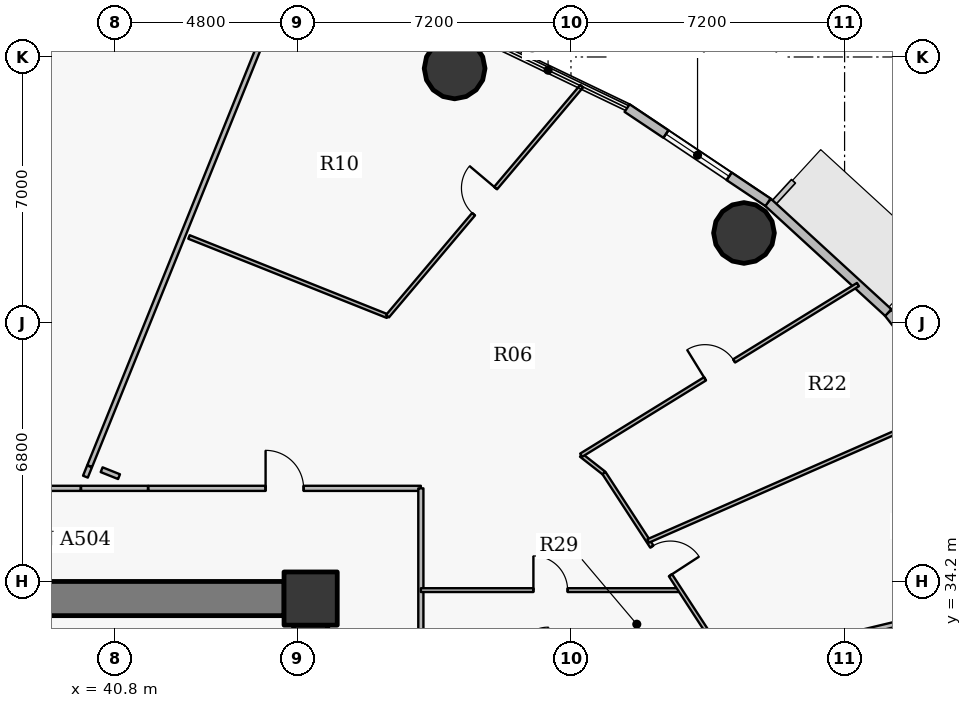
"""IFC4 building model, lengths in metres.
Left out: names, types, materials, properties, quantities, classifications, styles, units other than length and angle.
Written with IfcOpenShell. Run it as: python <this file> out.ifc"""

import sys

from ifc_helpers import new_model, si_unit, direction, frame, frame_2d, origin, origin_2d, place, context, subcontext, project, spatial, rectangle, hollow_circle, extrude, source, transform, mapped, element, fill, save


model = new_model("IFC4")
c1 = context("Model", 3, precision=1e-05, world=origin(), true_north=direction((0.0, 1.0)))
c2 = subcontext(c1, "Body", "Model", "MODEL_VIEW")
j1 = project(units=[si_unit("LENGTHUNIT", "METRE"), si_unit("PLANEANGLEUNIT", "RADIAN")], contexts=[c1])
p1 = place(None, origin())
s1 = spatial("IfcSite", under=j1, at=p1, CompositionType="ELEMENT")
p2 = place(p1, origin())
s2 = spatial("IfcBuilding", under=s1, at=p2, CompositionType="ELEMENT")
p3 = place(p2, frame((0.0, 0.0, 82.8)))
s3 = spatial("IfcBuildingStorey", under=s2, at=p3, CompositionType="ELEMENT", Elevation=82.8)
p4 = place(p3, frame((45.95, 33.75, 0.0), z_axis=(0.0, 0.0, 1.0), x_axis=(1.0, 0.0, 0.0)))
e1 = element("IfcColumn", 1, at=p4, inside=s3, PredefinedType="COLUMN", context=c2, shape_type="SweptSolid", body=[
    extrude(rectangle(XDim=1.4, YDim=1.4, at=origin_2d()), origin(), (0.0, 0.0, 1.0), 4.2),
])
p5 = place(p3, frame((26.75, 33.75, 0.0), z_axis=(0.0, 0.0, 1.0), x_axis=(1.0, 0.0, 0.0)))
e2 = element("IfcWall", 2, at=p5, inside=s3, PredefinedType="SHEAR", context=c2, shape_type="SweptSolid", body=[
    extrude(rectangle(XDim=18.5, YDim=0.9, at=frame_2d((9.25, 0.0))), origin(), (0.0, 0.0, 1.0), 3.35),
])
p6 = place(p3, frame((45.95, 33.05, 0.0), z_axis=(0.0, 0.0, 1.0), x_axis=(0.0, -1.0, 0.0)))
e3 = element("IfcWall", 3, at=p6, inside=s3, PredefinedType="SHEAR", context=c2, shape_type="SweptSolid", body=[
    extrude(rectangle(XDim=12.1, YDim=0.9, at=frame_2d((6.05, 0.0))), origin(), (0.0, 0.0, 1.0), 3.35),
])
p7 = place(p6, frame((5.64, 0.0, 0.0)))
e4 = element("IfcOpeningElement", 4, at=p7, cuts=e3, PredefinedType="OPENING", context=c2, shape_type="SweptSolid", body=[
    extrude(rectangle(XDim=0.82, YDim=2.1, at=origin_2d()), frame((0.41, 0.46, 1.05), z_axis=(0.0, -1.0, 0.0), x_axis=(1.0, 0.0, 0.0)), (0.0, 0.0, 1.0), 0.92),
])
for number, where, z_axis, x_axis in (
    (5, (57.353, 43.369, 0.0), (0.0, 0.0, 1.0), (1.0, 0.0, 0.0)),
    (6, (49.738, 47.699, 0.0), (0.0, 0.0, 1.0), (1.0, 0.0, 0.0)),
):
    element("IfcColumn", number, at=place(p3, frame(where, z_axis=z_axis, x_axis=x_axis)), inside=s3, PredefinedType="COLUMN", context=c2, shape_type="SweptSolid", body=[
        extrude(hollow_circle(Radius=0.8, WallThickness=0.045, at=origin_2d()), origin(), (0.0, 0.0, 1.0), 4.2),
    ])
p8 = place(p3, frame((61.15, 41.275, 0.0), z_axis=(0.0, 0.0, 1.0), x_axis=(0.616295508253, -0.787514981767, 0.0)))
e7 = element("IfcWall", 7, at=p8, inside=s3, PredefinedType="SOLIDWALL", context=c2, shape_type="SweptSolid", body=[
    extrude(rectangle(XDim=4.129, YDim=0.24, at=frame_2d((2.065, 0.0))), origin(), (0.0, 0.0, 1.0), 3.9),
])
p9 = place(p8, frame((0.908, 0.0, 0.9)))
e8 = element("IfcOpeningElement", 8, at=p9, cuts=e7, PredefinedType="OPENING", context=c2, shape_type="SweptSolid", body=[
    extrude(rectangle(XDim=1.6, YDim=1.75, at=origin_2d()), frame((0.8, 0.13, 0.875), z_axis=(0.0, -1.0, 0.0), x_axis=(1.0, 0.0, 0.0)), (0.0, 0.0, 1.0), 0.26),
])
p10 = place(p3, frame((57.985, 44.176, 0.0), z_axis=(0.0, 0.0, 1.0), x_axis=(0.737116376281, -0.67576582321, 0.0)))
e9 = element("IfcWall", 9, at=p10, inside=s3, PredefinedType="SOLIDWALL", context=c2, shape_type="SweptSolid", body=[
    extrude(rectangle(XDim=4.294, YDim=0.24, at=frame_2d((2.147, 0.0))), origin(), (0.0, 0.0, 1.0), 3.9),
])
p11 = place(p3, frame((54.277, 46.656, 0.0), z_axis=(0.0, 0.0, 1.0), x_axis=(0.831240982525, -0.555912249343, 0.0)))
e10 = element("IfcWall", 10, at=p11, inside=s3, PredefinedType="SOLIDWALL", context=c2, shape_type="SweptSolid", body=[
    extrude(rectangle(XDim=4.46, YDim=0.24, at=frame_2d((2.23, 0.0))), origin(), (0.0, 0.0, 1.0), 3.9),
])
p12 = place(p11, frame((1.23, 0.0, 0.9)))
e11 = element("IfcOpeningElement", 11, at=p12, cuts=e10, PredefinedType="OPENING", context=c2, shape_type="SweptSolid", body=[
    extrude(rectangle(XDim=2.0, YDim=1.75, at=origin_2d()), frame((1.0, 0.13, 0.875), z_axis=(0.0, -1.0, 0.0), x_axis=(1.0, 0.0, 0.0)), (0.0, 0.0, 1.0), 0.26),
])
p13 = place(p3, frame((32.101, 36.65, 0.0), z_axis=(0.0, 0.0, 1.0), x_axis=(1.0, 0.0, 0.0)))
e12 = element("IfcWall", 12, at=p13, inside=s3, PredefinedType="PARTITIONING", context=c2, shape_type="SweptSolid", body=[
    extrude(rectangle(XDim=7.798, YDim=0.135, at=frame_2d((3.899, 0.0))), origin(), (0.0, 0.0, 1.0), 3.235),
])
p14 = place(p13, frame((4.25, 0.0, 0.0)))
e13 = element("IfcOpeningElement", 13, at=p14, cuts=e12, PredefinedType="OPENING", context=c2, shape_type="SweptSolid", body=[
    extrude(rectangle(XDim=1.05, YDim=2.15, at=origin_2d()), frame((0.525, 0.078, 1.075), z_axis=(0.0, -1.0, 0.0), x_axis=(1.0, 0.0, 0.0)), (0.0, 0.0, 1.0), 0.155),
])
p15 = place(p13, frame((0.506, 0.0, 0.0)))
e14 = element("IfcOpeningElement", 14, at=p15, cuts=e12, PredefinedType="OPENING", context=c2, shape_type="SweptSolid", body=[
    extrude(rectangle(XDim=0.82, YDim=2.1, at=origin_2d()), frame((0.41, 0.078, 1.05), z_axis=(0.0, -1.0, 0.0), x_axis=(1.0, 0.0, 0.0)), (0.0, 0.0, 1.0), 0.155),
])
p16 = place(p3, frame((40.136, 37.236, 0.0), z_axis=(0.0, 0.0, 1.0), x_axis=(0.374600258899, 0.927186413852, 0.0)))
e15 = element("IfcWall", 15, at=p16, inside=s3, PredefinedType="PARTITIONING", context=c2, shape_type="SweptSolid", body=[
    extrude(rectangle(XDim=13.945, YDim=0.135, at=frame_2d((6.972, 0.0))), origin(), (0.0, 0.0, 1.0), 3.285),
])
p17 = place(p3, frame((41.679, 36.65, 0.0), z_axis=(0.0, 0.0, 1.0), x_axis=(1.0, 0.0, 0.0)))
e16 = element("IfcWall", 16, at=p17, inside=s3, PredefinedType="PARTITIONING", context=c2, shape_type="SweptSolid", body=[
    extrude(rectangle(XDim=7.171, YDim=0.135, at=frame_2d((3.586, 0.0))), origin(), (0.0, 0.0, 1.0), 3.235),
])
p18 = place(p17, frame((3.086, 0.0, 0.0)))
e17 = element("IfcOpeningElement", 17, at=p18, cuts=e16, PredefinedType="OPENING", context=c2, shape_type="SweptSolid", body=[
    extrude(rectangle(XDim=1.0, YDim=2.15, at=origin_2d()), frame((0.5, 0.078, 1.075), z_axis=(0.0, -1.0, 0.0), x_axis=(1.0, 0.0, 0.0)), (0.0, 0.0, 1.0), 0.155),
])
p19 = place(p3, frame((42.749, 43.264, 0.0), z_axis=(0.0, 0.0, 1.0), x_axis=(0.928808679707, -0.370559626107, 0.0)))
e18 = element("IfcWall", 18, at=p19, inside=s3, PredefinedType="PARTITIONING", context=c2, shape_type="SweptSolid", body=[
    extrude(rectangle(XDim=5.623, YDim=0.1, at=frame_2d((2.812, 0.0))), origin(), (0.0, 0.0, 1.0), 3.235),
])
p20 = place(p3, frame((47.972, 41.18, 0.0), z_axis=(0.0, 0.0, 1.0), x_axis=(0.645114462575, 0.764085944234, 0.0)))
e19 = element("IfcWall", 19, at=p20, inside=s3, PredefinedType="PARTITIONING", context=c2, shape_type="SweptSolid", body=[
    extrude(rectangle(XDim=7.923, YDim=0.1, at=frame_2d((3.961, 0.0))), origin(), (0.0, 0.0, 1.0), 3.285),
])
p21 = place(p20, frame((3.511, 0.0, 0.0)))
e20 = element("IfcOpeningElement", 20, at=p21, cuts=e19, PredefinedType="OPENING", context=c2, shape_type="SweptSolid", body=[
    extrude(rectangle(XDim=0.9, YDim=2.1, at=origin_2d()), frame((0.45, 0.06, 1.05), z_axis=(0.0, -1.0, 0.0), x_axis=(1.0, 0.0, 0.0)), (0.0, 0.0, 1.0), 0.12),
])
p22 = place(p3, frame((48.85, 30.638, 0.0), z_axis=(0.0, 0.0, 1.0), x_axis=(0.0, 1.0, 0.0)))
e21 = element("IfcWall", 21, at=p22, inside=s3, PredefinedType="PARTITIONING", context=c2, shape_type="SweptSolid", body=[
    extrude(rectangle(XDim=6.011, YDim=0.135, at=frame_2d((3.006, 0.0))), origin(), (0.0, 0.0, 1.0), 3.235),
])
p23 = place(p3, frame((48.85, 33.972, 0.0), z_axis=(0.0, 0.0, 1.0), x_axis=(1.0, 0.0, 0.0)))
e22 = element("IfcWall", 22, at=p23, inside=s3, PredefinedType="PARTITIONING", context=c2, shape_type="SweptSolid", body=[
    extrude(rectangle(XDim=6.823, YDim=0.1, at=frame_2d((3.412, 0.0))), origin(), (0.0, 0.0, 1.0), 3.9),
])
p24 = place(p23, frame((2.961, 0.0, 0.0)))
e23 = element("IfcOpeningElement", 23, at=p24, cuts=e22, PredefinedType="OPENING", context=c2, shape_type="SweptSolid", body=[
    extrude(rectangle(XDim=0.9, YDim=2.1, at=origin_2d()), frame((0.45, 0.06, 1.05), z_axis=(0.0, -1.0, 0.0), x_axis=(1.0, 0.0, 0.0)), (0.0, 0.0, 1.0), 0.12),
])
p25 = place(p3, frame((49.093, 30.138, 0.0), z_axis=(0.0, 0.0, 1.0), x_axis=(0.972454817416, 0.233091458627, 0.0)))
e24 = element("IfcWall", 24, at=p25, inside=s3, PredefinedType="PARTITIONING", context=c2, shape_type="SweptSolid", body=[
    extrude(rectangle(XDim=17.058, YDim=0.135, at=frame_2d((8.529, 0.0))), origin(), (0.0, 0.0, 1.0), 3.235),
])
p26 = place(p3, frame((53.068, 37.522, 0.0), z_axis=(0.0, 0.0, 1.0), x_axis=(0.787383409887, -0.616463596521, 0.0)))
e25 = element("IfcWall", 25, at=p26, inside=s3, PredefinedType="PARTITIONING", context=c2, shape_type="SweptSolid", body=[
    extrude(rectangle(XDim=0.763, YDim=0.1, at=frame_2d((0.381, 0.0))), origin(), (0.0, 0.0, 1.0), 3.9),
])
p27 = place(p3, frame((53.068, 37.522, 0.0), z_axis=(0.0, 0.0, 1.0), x_axis=(0.851237784686, 0.524780176763, 0.0)))
e26 = element("IfcWall", 26, at=p27, inside=s3, PredefinedType="PARTITIONING", context=c2, shape_type="SweptSolid", body=[
    extrude(rectangle(XDim=8.557, YDim=0.1, at=frame_2d((4.278, 0.0))), origin(), (0.0, 0.0, 1.0), 3.285),
])
p28 = place(p27, frame((3.828, 0.0, 0.0)))
e27 = element("IfcOpeningElement", 27, at=p28, cuts=e26, PredefinedType="OPENING", context=c2, shape_type="SweptSolid", body=[
    extrude(rectangle(XDim=0.9, YDim=2.1, at=origin_2d()), frame((0.45, 0.06, 1.05), z_axis=(0.0, -1.0, 0.0), x_axis=(1.0, 0.0, 0.0)), (0.0, 0.0, 1.0), 0.12),
])
p29 = place(p3, frame((53.669, 37.052, 0.0), z_axis=(0.0, 0.0, 1.0), x_axis=(0.545413765252, -0.8381669432, 0.0)))
e28 = element("IfcWall", 28, at=p29, inside=s3, PredefinedType="PARTITIONING", context=c2, shape_type="SweptSolid", body=[
    extrude(rectangle(XDim=5.688, YDim=0.1, at=frame_2d((2.844, 0.0))), origin(), (0.0, 0.0, 1.0), 3.235),
])
p30 = place(p29, frame((2.308, 0.0, 0.0)))
e29 = element("IfcOpeningElement", 29, at=p30, cuts=e28, PredefinedType="OPENING", context=c2, shape_type="SweptSolid", body=[
    extrude(rectangle(XDim=0.9, YDim=2.1, at=origin_2d()), frame((0.45, 0.06, 1.05), z_axis=(0.0, -1.0, 0.0), x_axis=(1.0, 0.0, 0.0)), (0.0, 0.0, 1.0), 0.12),
])
p31 = place(p3, frame((54.831, 35.266, 0.0), z_axis=(0.0, 0.0, 1.0), x_axis=(0.915674102686, 0.401921556613, 0.0)))
e30 = element("IfcWall", 30, at=p31, inside=s3, PredefinedType="PARTITIONING", context=c2, shape_type="SweptSolid", body=[
    extrude(rectangle(XDim=8.964, YDim=0.1, at=frame_2d((4.482, 0.0))), origin(), (0.0, 0.0, 1.0), 3.285),
])
p32 = place(p3, frame((39.909, 36.65, 0.0), z_axis=(0.0, 0.0, 1.0), x_axis=(1.0, 0.0, 0.0)))
e31 = element("IfcWall", 31, at=p32, inside=s3, PredefinedType="PARTITIONING", context=c2, shape_type="SweptSolid", body=[
    extrude(rectangle(XDim=1.76, YDim=0.135, at=frame_2d((0.88, 0.0))), origin(), (0.0, 0.0, 1.0), 3.9),
])
p33 = place(p3, frame((46.4, 34.2, 0.0), z_axis=(0.0, 0.0, 1.0), x_axis=(-1.0, 0.0, 0.0)))
e32 = element("IfcWall", 32, at=p33, inside=s3, PredefinedType="PARTITIONING", context=c2, shape_type="SweptSolid", body=[
    extrude(rectangle(XDim=1.14, YDim=0.135, at=frame_2d((0.57, 0.0))), origin(), (0.0, 0.0, 1.0), 3.235),
])
p34 = place(p3, frame((46.4, 33.06, 0.0), z_axis=(0.0, 0.0, 1.0), x_axis=(0.0, 1.0, 0.0)))
e33 = element("IfcWall", 33, at=p34, inside=s3, PredefinedType="PARTITIONING", context=c2, shape_type="SweptSolid", body=[
    extrude(rectangle(XDim=0.833, YDim=0.135, at=frame_2d((0.416, 0.0))), origin(), (0.0, 0.0, 1.0), 3.9),
])
p35 = place(p3, frame((40.132, 37.227, 0.0), z_axis=(0.0, 0.0, 1.0), x_axis=(-0.374574137078, -0.927196967118, 0.0)))
e34 = element("IfcWall", 34, at=p35, inside=s3, PredefinedType="PARTITIONING", context=c2, shape_type="SweptSolid", body=[
    extrude(rectangle(XDim=0.291, YDim=0.135, at=frame_2d((0.146, 0.0))), origin(), (0.0, 0.0, 1.0), 3.9),
])
p36 = place(p3, frame((40.908, 36.958, 0.0), z_axis=(0.0, 0.0, 1.0), x_axis=(-0.92881793224, 0.370536433768, 0.0)))
e35 = element("IfcWall", 35, at=p36, inside=s3, PredefinedType="PARTITIONING", context=c2, shape_type="SweptSolid", body=[
    extrude(rectangle(XDim=0.493, YDim=0.135, at=frame_2d((0.247, 0.0))), origin(), (0.0, 0.0, 1.0), 3.9),
])
m1 = source(origin(), c2, "Body", "SweptSolid", [
    extrude(rectangle(XDim=2.0, YDim=1.75, at=origin_2d()), frame((1.0, 0.03, 0.875), z_axis=(0.0, -1.0, 0.0), x_axis=(1.0, 0.0, 0.0)), (0.0, 0.0, 1.0), 0.06),
])
p37 = place(p12, origin())
e36 = element("IfcWindow", 36, at=p37, inside=s3, PartitioningType="DOUBLE_PANEL_VERTICAL", PredefinedType="WINDOW", context=c2, shape_type="MappedRepresentation", body=[
    mapped(m1, transform((0.0, 0.0, 0.0), x_axis=(1.0, 0.0, 0.0), y_axis=(0.0, 1.0, 0.0), z_axis=(0.0, 0.0, 1.0), scale=1.0)),
])
fill(e11, e36)
m2 = source(origin(), c2, "Body", "SweptSolid", [
    extrude(rectangle(XDim=1.0, YDim=2.15, at=origin_2d()), frame((0.5, 0.025, 1.075), z_axis=(0.0, -1.0, 0.0), x_axis=(1.0, 0.0, 0.0)), (0.0, 0.0, 1.0), 0.05),
])
p38 = place(p18, origin())
e37 = element("IfcDoor", 37, at=p38, inside=s3, OperationType="SINGLE_SWING_LEFT", PredefinedType="DOOR", context=c2, shape_type="MappedRepresentation", body=[
    mapped(m2, transform((0.0, 0.0, 0.0), x_axis=(1.0, 0.0, 0.0), y_axis=(0.0, 1.0, 0.0), z_axis=(0.0, 0.0, 1.0), scale=1.0)),
])
fill(e17, e37)
m3 = source(origin(), c2, "Body", "SweptSolid", [
    extrude(rectangle(XDim=0.9, YDim=2.1, at=origin_2d()), frame((0.45, 0.025, 1.05), z_axis=(0.0, -1.0, 0.0), x_axis=(1.0, 0.0, 0.0)), (0.0, 0.0, 1.0), 0.05),
])
p39 = place(p30, origin())
e38 = element("IfcDoor", 38, at=p39, inside=s3, OperationType="SINGLE_SWING_RIGHT", PredefinedType="DOOR", context=c2, shape_type="MappedRepresentation", body=[
    mapped(m3, transform((0.0, 0.0, 0.0), x_axis=(1.0, 0.0, 0.0), y_axis=(0.0, 1.0, 0.0), z_axis=(0.0, 0.0, 1.0), scale=1.0)),
])
fill(e29, e38)
p40 = place(p28, origin())
e39 = element("IfcDoor", 39, at=p40, inside=s3, OperationType="SINGLE_SWING_LEFT", PredefinedType="DOOR", context=c2, shape_type="MappedRepresentation", body=[
    mapped(m3, transform((0.0, 0.0, 0.0), x_axis=(1.0, 0.0, 0.0), y_axis=(0.0, 1.0, 0.0), z_axis=(0.0, 0.0, 1.0), scale=1.0)),
])
fill(e27, e39)
p41 = place(p21, origin())
e40 = element("IfcDoor", 40, at=p41, inside=s3, OperationType="SINGLE_SWING_RIGHT", PredefinedType="DOOR", context=c2, shape_type="MappedRepresentation", body=[
    mapped(m3, transform((0.0, 0.0, 0.0), x_axis=(1.0, 0.0, 0.0), y_axis=(0.0, 1.0, 0.0), z_axis=(0.0, 0.0, 1.0), scale=1.0)),
])
fill(e20, e40)
p42 = place(p24, origin())
e41 = element("IfcDoor", 41, at=p42, inside=s3, OperationType="SINGLE_SWING_LEFT", PredefinedType="DOOR", context=c2, shape_type="MappedRepresentation", body=[
    mapped(m3, transform((0.0, 0.0, 0.0), x_axis=(1.0, 0.0, 0.0), y_axis=(0.0, 1.0, 0.0), z_axis=(0.0, 0.0, 1.0), scale=1.0)),
])
fill(e23, e41)
save(model, sys.argv[1])
